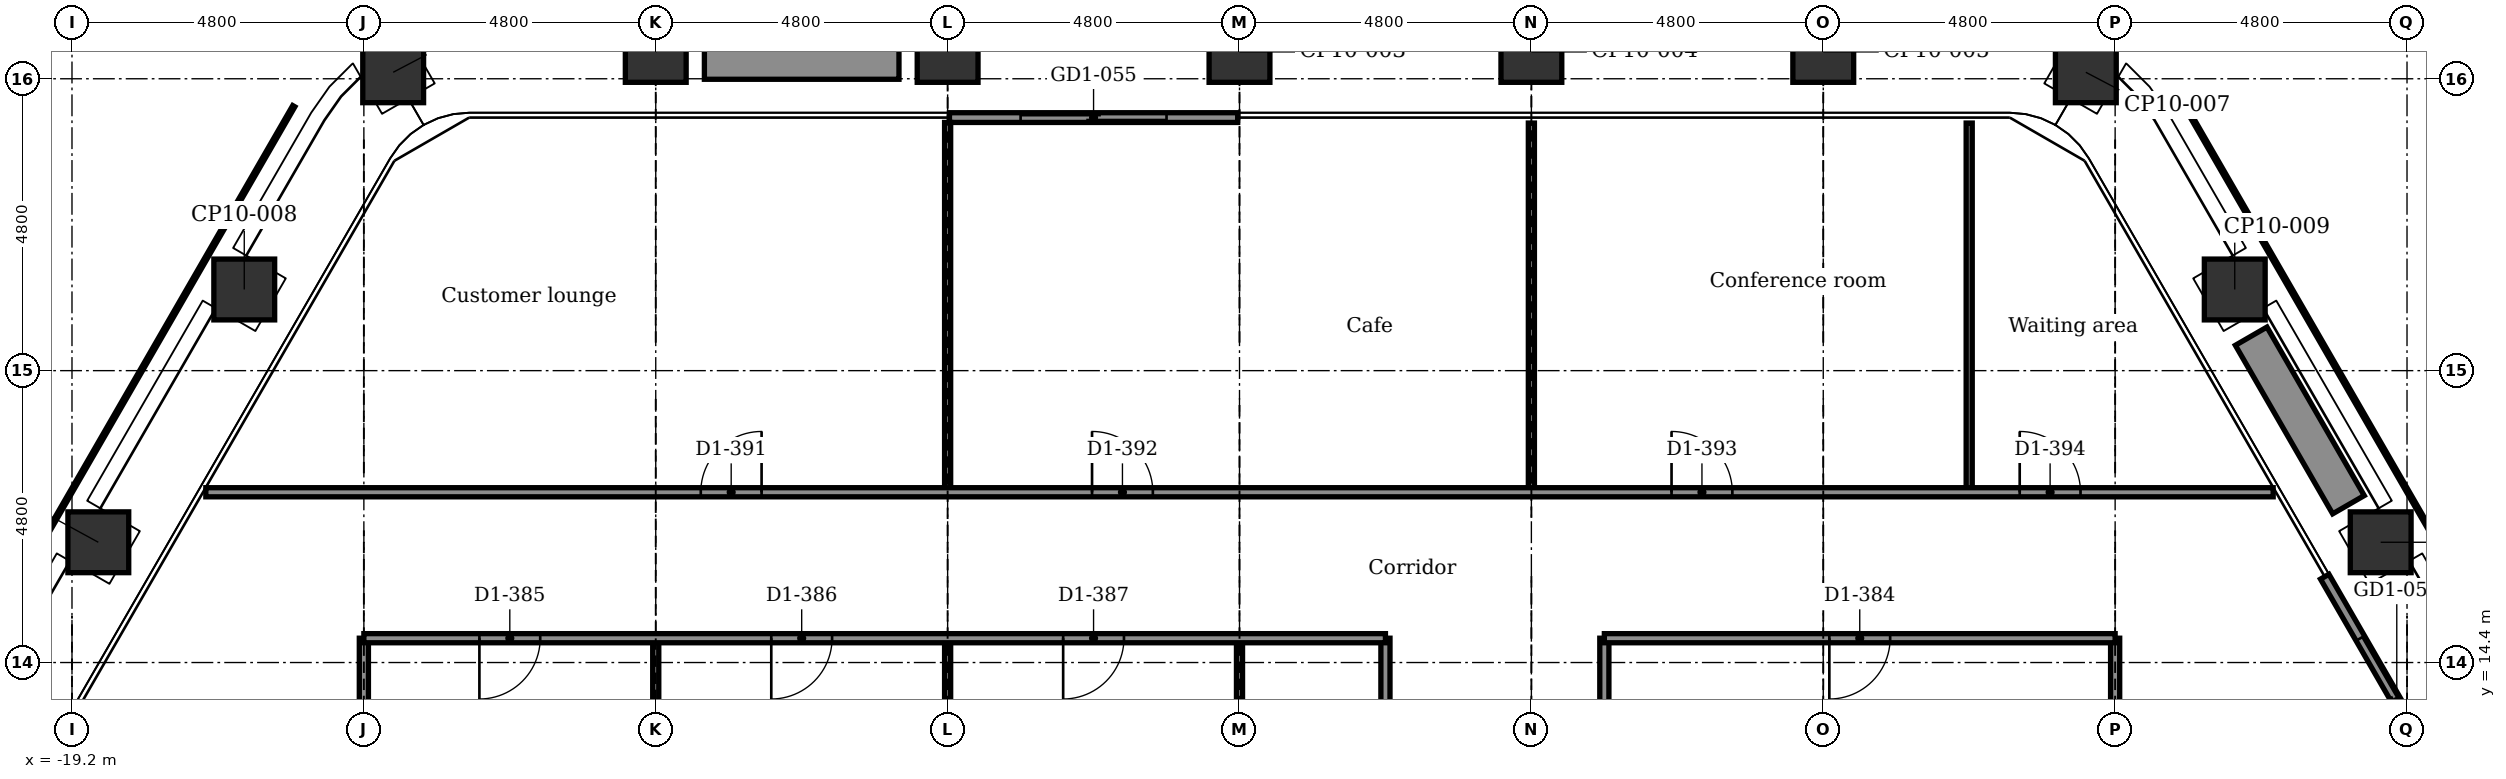
"""IFC4 building model, lengths in metres.
Left out: names, types, materials, properties, quantities, classifications, styles, units other than length and angle.
Written with IfcOpenShell. Run it as: python <this file> out.ifc"""

import sys

from ifc_helpers import new_model, si_unit, direction, frame, frame_2d, origin, origin_2d, place, context, subcontext, project, spatial, rectangle, extrude, element, fill, save


model = new_model("IFC4")
c1 = context("Model", 3, precision=1e-05, world=origin(), true_north=direction((0.0, 1.0)))
c2 = subcontext(c1, "Body", "Model", "MODEL_VIEW")
j1 = project(units=[si_unit("LENGTHUNIT", "METRE"), si_unit("PLANEANGLEUNIT", "RADIAN")], contexts=[c1])
p1 = place(None, origin())
s1 = spatial("IfcSite", under=j1, at=p1, CompositionType="ELEMENT")
p2 = place(p1, origin())
s2 = spatial("IfcBuilding", under=s1, at=p2, CompositionType="ELEMENT")
p3 = place(p2, frame((0.0, 0.0, 133.4)))
s3 = spatial("IfcBuildingStorey", under=s2, at=p3, CompositionType="ELEMENT", Elevation=133.4)
for number, where, z_axis, x_axis in (
    (1, (-13.918, 24.107, -0.15), (0.0, 0.0, 1.0), (0.866, 0.5, 0.0)),
    (2, (-9.6, 24.442, -0.15), (0.0, 0.0, 1.0), (1.0, 0.0, 0.0)),
    (3, (-4.8, 24.442, -0.15), (0.0, 0.0, 1.0), (1.0, 0.0, 0.0)),
    (4, (0.0, 24.442, -0.15), (0.0, 0.0, 1.0), (1.0, 0.0, 0.0)),
    (5, (4.8, 24.442, -0.15), (0.0, 0.0, 1.0), (1.0, 0.0, 0.0)),
    (6, (9.6, 24.442, -0.15), (0.0, 0.0, 1.0), (1.0, 0.0, 0.0)),
    (7, (13.918, 24.107, -0.15), (0.0, 0.0, 1.0), (0.5, 0.866, 0.0)),
    (8, (16.367, 20.535, -0.15), (0.0, 0.0, 1.0), (0.866, 0.5, 0.0)),
    (9, (18.767, 16.378, -0.15), (0.0, 0.0, 1.0), (0.866, 0.5, 0.0)),
    (10, (-18.767, 16.378, -0.15), (0.0, 0.0, 1.0), (0.5, 0.866, 0.0)),
    (11, (-16.367, 20.535, -0.15), (0.0, 0.0, 1.0), (0.5, 0.866, 0.0)),
):
    element("IfcColumn", number, at=place(p3, frame(where, z_axis=z_axis, x_axis=x_axis)), inside=s3, PredefinedType="COLUMN", context=c2, shape_type="SweptSolid", body=[
        extrude(rectangle(XDim=1.0, YDim=1.0, at=origin_2d()), origin(), (0.0, 0.0, 1.0), 5.4),
    ])
p4 = place(p3, frame((-4.77, 23.362, 0.0), z_axis=(0.0, 0.0, 1.0), x_axis=(1.0, 0.0, 0.0)))
e12 = element("IfcWall", 12, at=p4, inside=s3, PredefinedType="PARTITIONING", context=c2, shape_type="SweptSolid", body=[
    extrude(rectangle(XDim=4.74, YDim=0.16, at=frame_2d((2.37, 0.0))), origin(), (0.0, 0.0, 1.0), 5.25),
])
p5 = place(p4, frame((1.17, 0.0, 0.0)))
e13 = element("IfcOpeningElement", 13, at=p5, cuts=e12, PredefinedType="OPENING", context=c2, shape_type="SweptSolid", body=[
    extrude(rectangle(XDim=2.4, YDim=2.4, at=frame_2d((1.2, 1.2))), frame((0.0, 0.09, 0.0), z_axis=(0.0, -1.0, 0.0), x_axis=(1.0, 0.0, 0.0)), (0.0, 0.0, 1.0), 0.18),
])
p6 = place(p3, frame((17.847, 15.812, 0.0), z_axis=(0.0, 0.0, 1.0), x_axis=(0.5000167099, -0.866015756104, 0.0)))
e14 = element("IfcWall", 14, at=p6, inside=s3, PredefinedType="PARTITIONING", context=c2, shape_type="SweptSolid", body=[
    extrude(rectangle(XDim=4.74, YDim=0.16, at=frame_2d((2.37, 0.0))), origin(), (0.0, 0.0, 1.0), 5.25),
])
p7 = place(p6, frame((1.17, 0.0, 0.0)))
e15 = element("IfcOpeningElement", 15, at=p7, cuts=e14, PredefinedType="OPENING", context=c2, shape_type="SweptSolid", body=[
    extrude(rectangle(XDim=2.4, YDim=2.4, at=frame_2d((1.2, 1.2))), frame((0.0, 0.09, 0.0), z_axis=(0.0, -1.0, 0.0), x_axis=(1.0, 0.0, 0.0)), (0.0, 0.0, 1.0), 0.18),
])
for number, where, z_axis, x_axis in (
    (16, (-8.8, 24.292, 0.0), (0.0, 0.0, 1.0), (1.0, 0.0, 0.0)),
    (17, (16.637, 19.767, 0.0), (0.0, 0.0, 1.0), (0.5, -0.866, 0.0)),
):
    element("IfcWall", number, at=place(p3, frame(where, z_axis=z_axis, x_axis=x_axis)), inside=s3, PredefinedType="USERDEFINED", context=c2, shape_type="SweptSolid", body=[
        extrude(rectangle(XDim=3.2, YDim=0.6, at=frame_2d((1.6, 0.0))), origin(), (0.0, 0.0, 1.0), 0.7),
    ])
p8 = place(p3, frame((14.4, 10.0, 0.0), z_axis=(0.0, 0.0, 1.0), x_axis=(0.0, 1.0, 0.0)))
e18 = element("IfcWall", 18, at=p8, inside=s3, PredefinedType="PARTITIONING", context=c2, shape_type="SweptSolid", body=[
    extrude(rectangle(XDim=4.8, YDim=0.15, at=frame_2d((2.4, 0.0))), origin(), (0.0, 0.0, 1.0), 4.566),
])
p9 = place(p3, frame((12.0, 17.2, 0.0), z_axis=(0.0, 0.0, 1.0), x_axis=(0.0, 1.0, 0.0)))
e19 = element("IfcWall", 19, at=p9, inside=s3, PredefinedType="PARTITIONING", context=c2, shape_type="SweptSolid", body=[
    extrude(rectangle(XDim=6.072, YDim=0.1, at=frame_2d((3.036, 0.0))), origin(), (0.0, 0.0, 1.0), 5.25),
])
p10 = place(p3, frame((6.0, 9.95, 0.0), z_axis=(0.0, 0.0, 1.0), x_axis=(0.0, 1.0, 0.0)))
e20 = element("IfcWall", 20, at=p10, inside=s3, PredefinedType="PARTITIONING", context=c2, shape_type="SweptSolid", body=[
    extrude(rectangle(XDim=4.85, YDim=0.15, at=frame_2d((2.425, 0.0))), origin(), (0.0, 0.0, 1.0), 5.25),
])
p11 = place(p3, frame((4.8, 17.2, 0.0), z_axis=(0.0, 0.0, 1.0), x_axis=(0.0, 1.0, 0.0)))
e21 = element("IfcWall", 21, at=p11, inside=s3, PredefinedType="PARTITIONING", context=c2, shape_type="SweptSolid", body=[
    extrude(rectangle(XDim=6.072, YDim=0.1, at=frame_2d((3.036, 0.0))), origin(), (0.0, 0.0, 1.0), 4.566),
])
p12 = place(p3, frame((2.4, 9.95, 0.0), z_axis=(0.0, 0.0, 1.0), x_axis=(0.0, 1.0, 0.0)))
e22 = element("IfcWall", 22, at=p12, inside=s3, PredefinedType="PARTITIONING", context=c2, shape_type="SweptSolid", body=[
    extrude(rectangle(XDim=4.85, YDim=0.15, at=frame_2d((2.425, 0.0))), origin(), (0.0, 0.0, 1.0), 5.25),
])
p13 = place(p12, frame((1.225, 0.0, 0.0)))
e23 = element("IfcOpeningElement", 23, at=p13, cuts=e22, PredefinedType="OPENING", context=c2, shape_type="SweptSolid", body=[
    extrude(rectangle(XDim=1.0, YDim=2.1, at=frame_2d((0.5, 1.05))), frame((0.0, 0.085, 0.0), z_axis=(0.0, -1.0, 0.0), x_axis=(1.0, 0.0, 0.0)), (0.0, 0.0, 1.0), 0.17),
])
for number, where, z_axis, x_axis in (
    (24, (0.0, 9.95, 0.0), (0.0, 0.0, 1.0), (0.0, 1.0, 0.0)),
    (25, (-4.8, 9.95, 0.0), (0.0, 0.0, 1.0), (0.0, 1.0, 0.0)),
):
    element("IfcWall", number, at=place(p3, frame(where, z_axis=z_axis, x_axis=x_axis)), inside=s3, PredefinedType="PARTITIONING", context=c2, shape_type="SweptSolid", body=[
        extrude(rectangle(XDim=4.85, YDim=0.1, at=frame_2d((2.425, 0.0))), origin(), (0.0, 0.0, 1.0), 4.566),
    ])
p14 = place(p3, frame((-4.8, 17.2, 0.0), z_axis=(0.0, 0.0, 1.0), x_axis=(0.0, 1.0, 0.0)))
e26 = element("IfcWall", 26, at=p14, inside=s3, PredefinedType="PARTITIONING", context=c2, shape_type="SweptSolid", body=[
    extrude(rectangle(XDim=6.082, YDim=0.1, at=frame_2d((3.041, 0.0))), origin(), (0.0, 0.0, 1.0), 4.566),
])
p15 = place(p3, frame((-9.6, 10.15, 0.0), z_axis=(0.0, 0.0, 1.0), x_axis=(0.0, 1.0, 0.0)))
e27 = element("IfcWall", 27, at=p15, inside=s3, PredefinedType="PARTITIONING", context=c2, shape_type="SweptSolid", body=[
    extrude(rectangle(XDim=4.65, YDim=0.1, at=frame_2d((2.325, 0.0))), origin(), (0.0, 0.0, 1.0), 4.566),
])
p16 = place(p3, frame((-14.4, 10.0, 0.0), z_axis=(0.0, 0.0, 1.0), x_axis=(0.0, 1.0, 0.0)))
e28 = element("IfcWall", 28, at=p16, inside=s3, PredefinedType="PARTITIONING", context=c2, shape_type="SweptSolid", body=[
    extrude(rectangle(XDim=4.8, YDim=0.15, at=frame_2d((2.4, 0.0))), origin(), (0.0, 0.0, 1.0), 4.566),
])
p17 = place(p3, frame((-14.4, 14.8, 0.0), z_axis=(0.0, 0.0, 1.0), x_axis=(1.0, 0.0, 0.0)))
e29 = element("IfcWall", 29, at=p17, inside=s3, PredefinedType="PARTITIONING", context=c2, shape_type="SweptSolid", body=[
    extrude(rectangle(XDim=16.8, YDim=0.15, at=frame_2d((8.4, 0.0))), origin(), (0.0, 0.0, 1.0), 5.25),
])
p18 = place(p17, frame((1.9, 0.0, 0.0)))
e30 = element("IfcOpeningElement", 30, at=p18, cuts=e29, PredefinedType="OPENING", context=c2, shape_type="SweptSolid", body=[
    extrude(rectangle(XDim=1.0, YDim=2.1, at=frame_2d((0.5, 1.05))), frame((0.0, 0.085, 0.0), z_axis=(0.0, -1.0, 0.0), x_axis=(1.0, 0.0, 0.0)), (0.0, 0.0, 1.0), 0.17),
])
p19 = place(p17, frame((6.7, 0.0, 0.0)))
e31 = element("IfcOpeningElement", 31, at=p19, cuts=e29, PredefinedType="OPENING", context=c2, shape_type="SweptSolid", body=[
    extrude(rectangle(XDim=1.0, YDim=2.1, at=frame_2d((0.5, 1.05))), frame((0.0, 0.085, 0.0), z_axis=(0.0, -1.0, 0.0), x_axis=(1.0, 0.0, 0.0)), (0.0, 0.0, 1.0), 0.17),
])
p20 = place(p17, frame((11.5, 0.0, 0.0)))
e32 = element("IfcOpeningElement", 32, at=p20, cuts=e29, PredefinedType="OPENING", context=c2, shape_type="SweptSolid", body=[
    extrude(rectangle(XDim=1.0, YDim=2.1, at=frame_2d((0.5, 1.05))), frame((0.0, 0.085, 0.0), z_axis=(0.0, -1.0, 0.0), x_axis=(1.0, 0.0, 0.0)), (0.0, 0.0, 1.0), 0.17),
])
p21 = place(p3, frame((6.0, 14.8, 0.0), z_axis=(0.0, 0.0, 1.0), x_axis=(1.0, 0.0, 0.0)))
e33 = element("IfcWall", 33, at=p21, inside=s3, PredefinedType="PARTITIONING", context=c2, shape_type="SweptSolid", body=[
    extrude(rectangle(XDim=8.4, YDim=0.15, at=frame_2d((4.2, 0.0))), origin(), (0.0, 0.0, 1.0), 5.25),
])
p22 = place(p21, frame((3.7, 0.0, 0.0)))
e34 = element("IfcOpeningElement", 34, at=p22, cuts=e33, PredefinedType="OPENING", context=c2, shape_type="SweptSolid", body=[
    extrude(rectangle(XDim=1.0, YDim=2.1, at=frame_2d((0.5, 1.05))), frame((0.0, 0.085, 0.0), z_axis=(0.0, -1.0, 0.0), x_axis=(1.0, 0.0, 0.0)), (0.0, 0.0, 1.0), 0.17),
])
p23 = place(p3, frame((-16.999, 17.2, 0.0), z_axis=(0.0, 0.0, 1.0), x_axis=(1.0, 0.0, 0.0)))
e35 = element("IfcWall", 35, at=p23, inside=s3, PredefinedType="PARTITIONING", context=c2, shape_type="SweptSolid", body=[
    extrude(rectangle(XDim=33.998, YDim=0.15, at=frame_2d((16.999, 0.0))), origin(), (0.0, 0.0, 1.0), 5.25),
])
p24 = place(p23, frame((8.14, 0.0, 0.0)))
e36 = element("IfcOpeningElement", 36, at=p24, cuts=e35, PredefinedType="OPENING", context=c2, shape_type="SweptSolid", body=[
    extrude(rectangle(XDim=1.0, YDim=2.1, at=frame_2d((0.5, 1.05))), frame((0.0, 0.085, 0.0), z_axis=(0.0, -1.0, 0.0), x_axis=(1.0, 0.0, 0.0)), (0.0, 0.0, 1.0), 0.17),
])
p25 = place(p23, frame((14.574, 0.0, 0.0)))
e37 = element("IfcOpeningElement", 37, at=p25, cuts=e35, PredefinedType="OPENING", context=c2, shape_type="SweptSolid", body=[
    extrude(rectangle(XDim=1.0, YDim=2.1, at=frame_2d((0.5, 1.05))), frame((0.0, 0.085, 0.0), z_axis=(0.0, -1.0, 0.0), x_axis=(1.0, 0.0, 0.0)), (0.0, 0.0, 1.0), 0.17),
])
p26 = place(p23, frame((24.104, 0.0, 0.0)))
e38 = element("IfcOpeningElement", 38, at=p26, cuts=e35, PredefinedType="OPENING", context=c2, shape_type="SweptSolid", body=[
    extrude(rectangle(XDim=1.0, YDim=2.1, at=frame_2d((0.5, 1.05))), frame((0.0, 0.085, 0.0), z_axis=(0.0, -1.0, 0.0), x_axis=(1.0, 0.0, 0.0)), (0.0, 0.0, 1.0), 0.17),
])
p27 = place(p23, frame((29.83, 0.0, 0.0)))
e39 = element("IfcOpeningElement", 39, at=p27, cuts=e35, PredefinedType="OPENING", context=c2, shape_type="SweptSolid", body=[
    extrude(rectangle(XDim=1.0, YDim=2.1, at=frame_2d((0.5, 1.05))), frame((0.0, 0.085, 0.0), z_axis=(0.0, -1.0, 0.0), x_axis=(1.0, 0.0, 0.0)), (0.0, 0.0, 1.0), 0.17),
])
p28 = place(p5, origin())
e40 = element("IfcDoor", 40, at=p28, inside=s3, OperationType="DOUBLE_DOOR_SLIDING", PredefinedType="DOOR", context=c2, shape_type="SweptSolid", body=[
    extrude(rectangle(XDim=2.4, YDim=2.4, at=frame_2d((1.2, 1.2))), frame((0.0, 0.025, 0.0), z_axis=(0.0, -1.0, 0.0), x_axis=(1.0, 0.0, 0.0)), (0.0, 0.0, 1.0), 0.05),
])
fill(e13, e40)
p29 = place(p7, origin())
e41 = element("IfcDoor", 41, at=p29, inside=s3, OperationType="DOUBLE_DOOR_SLIDING", PredefinedType="DOOR", context=c2, shape_type="SweptSolid", body=[
    extrude(rectangle(XDim=2.4, YDim=2.4, at=frame_2d((1.2, 1.2))), frame((0.0, 0.025, 0.0), z_axis=(0.0, -1.0, 0.0), x_axis=(1.0, 0.0, 0.0)), (0.0, 0.0, 1.0), 0.05),
])
fill(e15, e41)
p30 = place(p22, frame((1.0, 0.0, 0.0), z_axis=(0.0, 0.0, 1.0), x_axis=(-1.0, 0.0, 0.0)))
e42 = element("IfcDoor", 42, at=p30, inside=s3, OperationType="SINGLE_SWING_LEFT", PredefinedType="DOOR", context=c2, shape_type="SweptSolid", body=[
    extrude(rectangle(XDim=1.0, YDim=2.1, at=frame_2d((0.5, 1.05))), frame((0.0, 0.025, 0.0), z_axis=(0.0, -1.0, 0.0), x_axis=(1.0, 0.0, 0.0)), (0.0, 0.0, 1.0), 0.05),
])
fill(e34, e42)
p31 = place(p18, frame((1.0, 0.0, 0.0), z_axis=(0.0, 0.0, 1.0), x_axis=(-1.0, 0.0, 0.0)))
e43 = element("IfcDoor", 43, at=p31, inside=s3, OperationType="SINGLE_SWING_LEFT", PredefinedType="DOOR", context=c2, shape_type="SweptSolid", body=[
    extrude(rectangle(XDim=1.0, YDim=2.1, at=frame_2d((0.5, 1.05))), frame((0.0, 0.025, 0.0), z_axis=(0.0, -1.0, 0.0), x_axis=(1.0, 0.0, 0.0)), (0.0, 0.0, 1.0), 0.05),
])
fill(e30, e43)
p32 = place(p19, frame((1.0, 0.0, 0.0), z_axis=(0.0, 0.0, 1.0), x_axis=(-1.0, 0.0, 0.0)))
e44 = element("IfcDoor", 44, at=p32, inside=s3, OperationType="SINGLE_SWING_LEFT", PredefinedType="DOOR", context=c2, shape_type="SweptSolid", body=[
    extrude(rectangle(XDim=1.0, YDim=2.1, at=frame_2d((0.5, 1.05))), frame((0.0, 0.025, 0.0), z_axis=(0.0, -1.0, 0.0), x_axis=(1.0, 0.0, 0.0)), (0.0, 0.0, 1.0), 0.05),
])
fill(e31, e44)
p33 = place(p20, frame((1.0, 0.0, 0.0), z_axis=(0.0, 0.0, 1.0), x_axis=(-1.0, 0.0, 0.0)))
e45 = element("IfcDoor", 45, at=p33, inside=s3, OperationType="SINGLE_SWING_LEFT", PredefinedType="DOOR", context=c2, shape_type="SweptSolid", body=[
    extrude(rectangle(XDim=1.0, YDim=2.1, at=frame_2d((0.5, 1.05))), frame((0.0, 0.025, 0.0), z_axis=(0.0, -1.0, 0.0), x_axis=(1.0, 0.0, 0.0)), (0.0, 0.0, 1.0), 0.05),
])
fill(e32, e45)
p34 = place(p24, origin())
e46 = element("IfcDoor", 46, at=p34, inside=s3, OperationType="SINGLE_SWING_RIGHT", PredefinedType="DOOR", context=c2, shape_type="SweptSolid", body=[
    extrude(rectangle(XDim=1.0, YDim=2.1, at=frame_2d((0.5, 1.05))), frame((0.0, 0.025, 0.0), z_axis=(0.0, -1.0, 0.0), x_axis=(1.0, 0.0, 0.0)), (0.0, 0.0, 1.0), 0.05),
])
fill(e36, e46)
p35 = place(p25, origin())
e47 = element("IfcDoor", 47, at=p35, inside=s3, OperationType="SINGLE_SWING_LEFT", PredefinedType="DOOR", context=c2, shape_type="SweptSolid", body=[
    extrude(rectangle(XDim=1.0, YDim=2.1, at=frame_2d((0.5, 1.05))), frame((0.0, 0.025, 0.0), z_axis=(0.0, -1.0, 0.0), x_axis=(1.0, 0.0, 0.0)), (0.0, 0.0, 1.0), 0.05),
])
fill(e37, e47)
p36 = place(p26, origin())
e48 = element("IfcDoor", 48, at=p36, inside=s3, OperationType="SINGLE_SWING_LEFT", PredefinedType="DOOR", context=c2, shape_type="SweptSolid", body=[
    extrude(rectangle(XDim=1.0, YDim=2.1, at=frame_2d((0.5, 1.05))), frame((0.0, 0.025, 0.0), z_axis=(0.0, -1.0, 0.0), x_axis=(1.0, 0.0, 0.0)), (0.0, 0.0, 1.0), 0.05),
])
fill(e38, e48)
p37 = place(p27, origin())
e49 = element("IfcDoor", 49, at=p37, inside=s3, OperationType="SINGLE_SWING_LEFT", PredefinedType="DOOR", context=c2, shape_type="SweptSolid", body=[
    extrude(rectangle(XDim=1.0, YDim=2.1, at=frame_2d((0.5, 1.05))), frame((0.0, 0.025, 0.0), z_axis=(0.0, -1.0, 0.0), x_axis=(1.0, 0.0, 0.0)), (0.0, 0.0, 1.0), 0.05),
])
fill(e39, e49)
save(model, sys.argv[1])
